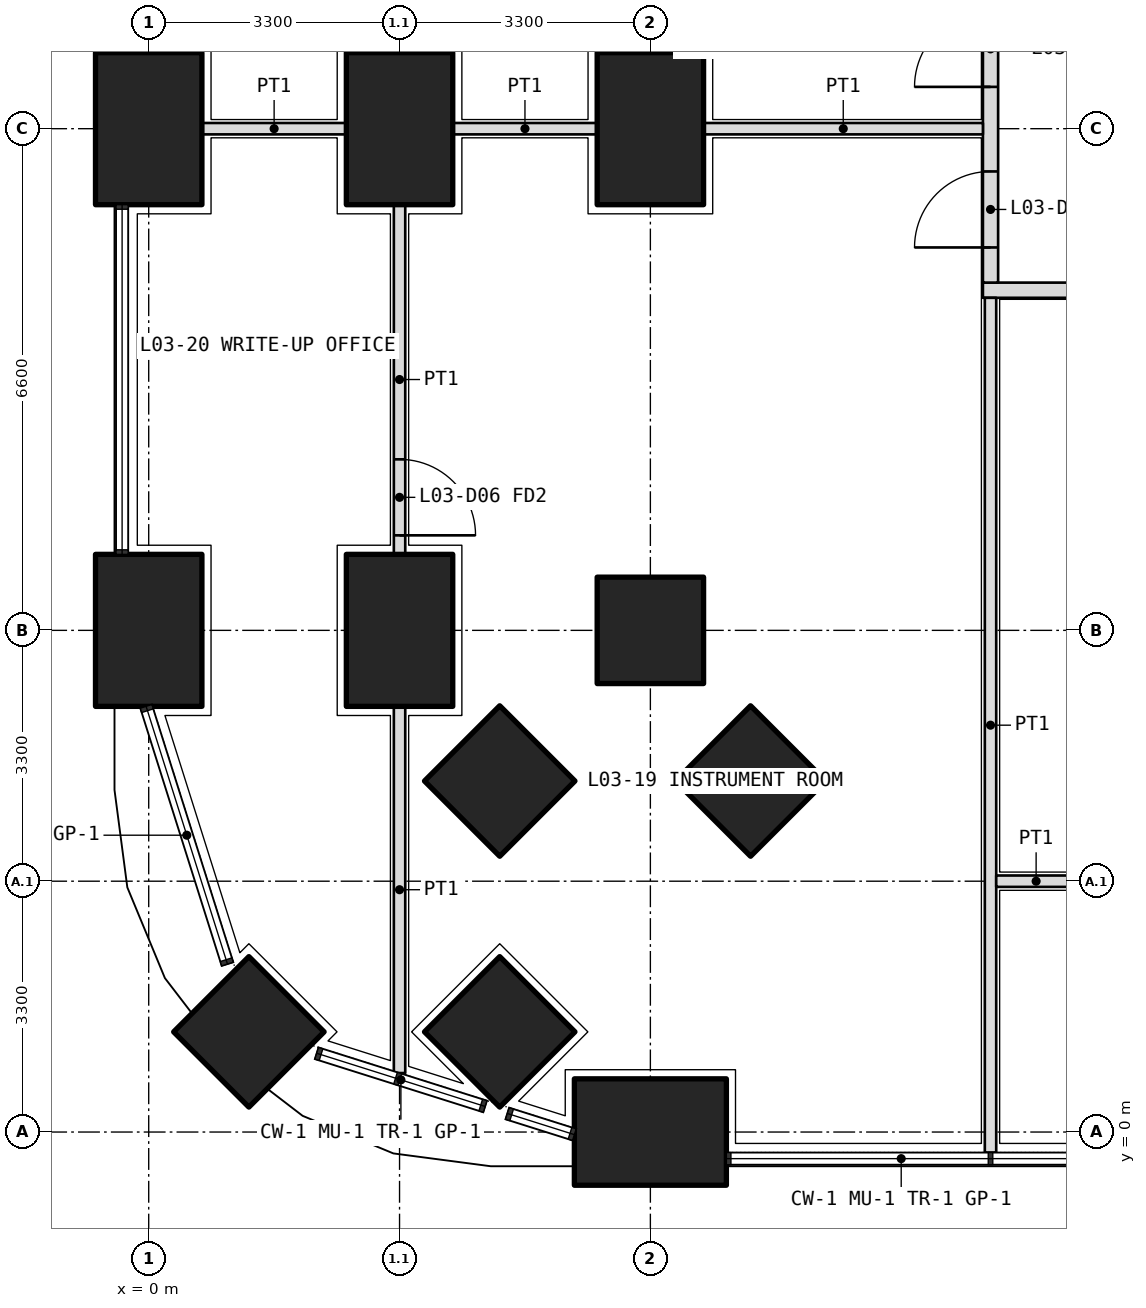
"""IFC4 building model, lengths in metres.
Left out: names, types, materials, properties, quantities, classifications, styles, units other than length and angle.
Written with IfcOpenShell. Run it as: python <this file> out.ifc"""

import sys

from ifc_helpers import new_model, si_unit, direction, frame, frame_2d, origin, origin_2d, place, context, subcontext, project, spatial, rectangle, extrude, element, fill, save


model = new_model("IFC4")
c1 = context("Model", 3, precision=1e-05, world=origin(), true_north=direction((0.0, 1.0)))
c2 = subcontext(c1, "Body", "Model", "MODEL_VIEW")
j1 = project(units=[si_unit("LENGTHUNIT", "METRE"), si_unit("PLANEANGLEUNIT", "RADIAN")], contexts=[c1])
p1 = place(None, origin())
s1 = spatial("IfcSite", under=j1, at=p1, CompositionType="ELEMENT")
p2 = place(p1, origin())
s2 = spatial("IfcBuilding", under=s1, at=p2, CompositionType="ELEMENT")
p3 = place(p2, frame((0.0, 0.0, 17.1)))
s3 = spatial("IfcBuildingStorey", under=s2, at=p3, CompositionType="ELEMENT", Elevation=17.1)
p4 = place(p3, frame((1.318, 1.318, 0.0), z_axis=(0.0, 0.0, 1.0), x_axis=(0.707106781187, 0.707106781187, 0.0)))
e1 = element("IfcColumn", 1, at=p4, inside=s3, PredefinedType="COLUMN", context=c2, shape_type="SweptSolid", body=[
    extrude(rectangle(XDim=1.4, YDim=1.4, at=origin_2d()), origin(), (0.0, 0.0, 1.0), 4.2),
])
for number, where, z_axis, x_axis in (
    (2, (6.6, 0.0, 0.0), (0.0, 0.0, 1.0), (1.0, 0.0, 0.0)),
    (3, (0.0, 6.6, 0.0), (0.0, 0.0, 1.0), (0.0, 1.0, 0.0)),
    (4, (0.0, 13.2, 0.0), (0.0, 0.0, 1.0), (0.0, 1.0, 0.0)),
):
    element("IfcColumn", number, at=place(p3, frame(where, z_axis=z_axis, x_axis=x_axis)), inside=s3, PredefinedType="COLUMN", context=c2, shape_type="SweptSolid", body=[
        extrude(rectangle(XDim=2.0, YDim=1.4, at=origin_2d()), origin(), (0.0, 0.0, 1.0), 4.2),
    ])
for number, where, z_axis, x_axis in (
    (5, (6.6, 6.6, 0.0), (0.0, 0.0, 1.0), (1.0, 0.0, 0.0)),
    (6, (4.618, 1.318, 0.0), (0.0, 0.0, 1.0), (0.707, 0.707, 0.0)),
):
    element("IfcColumn", number, at=place(p3, frame(where, z_axis=z_axis, x_axis=x_axis)), inside=s3, PredefinedType="COLUMN", context=c2, shape_type="SweptSolid", body=[
        extrude(rectangle(XDim=1.4, YDim=1.4, at=origin_2d()), origin(), (0.0, 0.0, 1.0), 4.2),
    ])
for number, where, z_axis, x_axis in (
    (7, (3.3, 6.6, 0.0), (0.0, 0.0, 1.0), (0.0, 1.0, 0.0)),
    (8, (3.3, 13.2, 0.0), (0.0, 0.0, 1.0), (0.0, 1.0, 0.0)),
):
    element("IfcColumn", number, at=place(p3, frame(where, z_axis=z_axis, x_axis=x_axis)), inside=s3, PredefinedType="COLUMN", context=c2, shape_type="SweptSolid", body=[
        extrude(rectangle(XDim=2.0, YDim=1.4, at=origin_2d()), origin(), (0.0, 0.0, 1.0), 4.2),
    ])
for number, where, z_axis, x_axis in (
    (9, (4.618, 4.618, 0.0), (0.0, 0.0, 1.0), (0.707, 0.707, 0.0)),
    (10, (7.918, 4.618, 0.0), (0.0, 0.0, 1.0), (0.707, 0.707, 0.0)),
):
    element("IfcColumn", number, at=place(p3, frame(where, z_axis=z_axis, x_axis=x_axis)), inside=s3, PredefinedType="COLUMN", context=c2, shape_type="SweptSolid", body=[
        extrude(rectangle(XDim=1.4, YDim=1.4, at=origin_2d()), origin(), (0.0, 0.0, 1.0), 4.2),
    ])
p5 = place(p3, frame((6.6, 13.2, 0.0), z_axis=(0.0, 0.0, 1.0), x_axis=(0.0, 1.0, 0.0)))
e11 = element("IfcColumn", 11, at=p5, inside=s3, PredefinedType="COLUMN", context=c2, shape_type="SweptSolid", body=[
    extrude(rectangle(XDim=2.0, YDim=1.4, at=origin_2d()), origin(), (0.0, 0.0, 1.0), 4.2),
])
p6 = place(p3, frame((10.975, 11.075, 0.0), z_axis=(0.0, 0.0, 1.0), x_axis=(1.0, 0.0, 0.0)))
e12 = element("IfcWall", 12, at=p6, inside=s3, PredefinedType="PARTITIONING", context=c2, shape_type="SweptSolid", body=[
    extrude(rectangle(XDim=18.725, YDim=0.2, at=frame_2d((9.362, 0.0))), origin(), (0.0, 0.0, 1.0), 2.85),
])
p7 = place(p6, frame((8.913, 0.0, 0.0)))
e13 = element("IfcOpeningElement", 13, at=p7, cuts=e12, PredefinedType="OPENING", context=c2, shape_type="SweptSolid", body=[
    extrude(rectangle(XDim=1.0, YDim=2.1, at=frame_2d((0.5, 1.05))), frame((0.0, 0.11, 0.0), z_axis=(0.0, -1.0, 0.0), x_axis=(1.0, 0.0, 0.0)), (0.0, 0.0, 1.0), 0.22),
])
p8 = place(p3, frame((11.075, 11.175, 0.0), z_axis=(0.0, 0.0, 1.0), x_axis=(0.0, 1.0, 0.0)))
e14 = element("IfcWall", 14, at=p8, inside=s3, PredefinedType="PARTITIONING", context=c2, shape_type="SweptSolid", body=[
    extrude(rectangle(XDim=23.85, YDim=0.2, at=frame_2d((11.925, 0.0))), origin(), (0.0, 0.0, 1.0), 2.85),
])
p9 = place(p8, frame((0.462, 0.0, 0.0)))
e15 = element("IfcOpeningElement", 15, at=p9, cuts=e14, PredefinedType="OPENING", context=c2, shape_type="SweptSolid", body=[
    extrude(rectangle(XDim=1.0, YDim=2.1, at=frame_2d((0.5, 1.05))), frame((0.0, 0.11, 0.0), z_axis=(0.0, -1.0, 0.0), x_axis=(1.0, 0.0, 0.0)), (0.0, 0.0, 1.0), 0.22),
])
p10 = place(p8, frame((2.575, 0.0, 0.0)))
e16 = element("IfcOpeningElement", 16, at=p10, cuts=e14, PredefinedType="OPENING", context=c2, shape_type="SweptSolid", body=[
    extrude(rectangle(XDim=1.0, YDim=2.1, at=frame_2d((0.5, 1.05))), frame((0.0, 0.11, 0.0), z_axis=(0.0, -1.0, 0.0), x_axis=(1.0, 0.0, 0.0)), (0.0, 0.0, 1.0), 0.22),
])
p11 = place(p8, frame((5.65, 0.0, 0.0)))
e17 = element("IfcOpeningElement", 17, at=p11, cuts=e14, PredefinedType="OPENING", context=c2, shape_type="SweptSolid", body=[
    extrude(rectangle(XDim=0.9, YDim=2.1, at=frame_2d((0.45, 1.05))), frame((0.0, 0.11, 0.0), z_axis=(0.0, -1.0, 0.0), x_axis=(1.0, 0.0, 0.0)), (0.0, 0.0, 1.0), 0.22),
])
p12 = place(p8, frame((9.5, 0.0, 0.0)))
e18 = element("IfcOpeningElement", 18, at=p12, cuts=e14, PredefinedType="OPENING", context=c2, shape_type="SweptSolid", body=[
    extrude(rectangle(XDim=0.9, YDim=2.1, at=frame_2d((0.45, 1.05))), frame((0.0, 0.11, 0.0), z_axis=(0.0, -1.0, 0.0), x_axis=(1.0, 0.0, 0.0)), (0.0, 0.0, 1.0), 0.22),
])
p13 = place(p8, frame((13.025, 0.0, 0.0)))
e19 = element("IfcOpeningElement", 19, at=p13, cuts=e14, PredefinedType="OPENING", context=c2, shape_type="SweptSolid", body=[
    extrude(rectangle(XDim=1.0, YDim=2.1, at=frame_2d((0.5, 1.05))), frame((0.0, 0.11, 0.0), z_axis=(0.0, -1.0, 0.0), x_axis=(1.0, 0.0, 0.0)), (0.0, 0.0, 1.0), 0.22),
])
p14 = place(p8, frame((16.375, 0.0, 0.0)))
e20 = element("IfcOpeningElement", 20, at=p14, cuts=e14, PredefinedType="OPENING", context=c2, shape_type="SweptSolid", body=[
    extrude(rectangle(XDim=1.0, YDim=2.1, at=frame_2d((0.5, 1.05))), frame((0.0, 0.11, 0.0), z_axis=(0.0, -1.0, 0.0), x_axis=(1.0, 0.0, 0.0)), (0.0, 0.0, 1.0), 0.22),
])
p15 = place(p8, frame((20.738, 0.0, 0.0)))
e21 = element("IfcOpeningElement", 21, at=p15, cuts=e14, PredefinedType="OPENING", context=c2, shape_type="SweptSolid", body=[
    extrude(rectangle(XDim=1.0, YDim=2.1, at=frame_2d((0.5, 1.05))), frame((0.0, 0.11, 0.0), z_axis=(0.0, -1.0, 0.0), x_axis=(1.0, 0.0, 0.0)), (0.0, 0.0, 1.0), 0.22),
])
p16 = place(p3, frame((11.075, -0.27, 0.0), z_axis=(0.0, 0.0, 1.0), x_axis=(0.0, 1.0, 0.0)))
e22 = element("IfcWall", 22, at=p16, inside=s3, PredefinedType="PARTITIONING", context=c2, shape_type="SweptSolid", body=[
    extrude(rectangle(XDim=11.245, YDim=0.15, at=frame_2d((5.623, 0.0))), origin(), (0.0, 0.0, 1.0), 2.7),
])
p17 = place(p3, frame((11.15, 3.3, 0.0), z_axis=(0.0, 0.0, 1.0), x_axis=(1.0, 0.0, 0.0)))
e23 = element("IfcWall", 23, at=p17, inside=s3, PredefinedType="PARTITIONING", context=c2, shape_type="SweptSolid", body=[
    extrude(rectangle(XDim=1.05, YDim=0.15, at=frame_2d((0.525, 0.0))), origin(), (0.0, 0.0, 1.0), 3.9),
])
p18 = place(p3, frame((3.3, 12.2, 0.0), z_axis=(0.0, 0.0, 1.0), x_axis=(0.0, -1.0, 0.0)))
e24 = element("IfcWall", 24, at=p18, inside=s3, PredefinedType="PARTITIONING", context=c2, shape_type="SweptSolid", body=[
    extrude(rectangle(XDim=4.6, YDim=0.15, at=frame_2d((2.3, 0.0))), origin(), (0.0, 0.0, 1.0), 3.9),
])
p19 = place(p18, frame((3.35, 0.0, 0.0)))
e25 = element("IfcOpeningElement", 25, at=p19, cuts=e24, PredefinedType="OPENING", context=c2, shape_type="SweptSolid", body=[
    extrude(rectangle(XDim=1.0, YDim=2.1, at=frame_2d((0.5, 1.05))), frame((0.0, 0.085, 0.0), z_axis=(0.0, -1.0, 0.0), x_axis=(1.0, 0.0, 0.0)), (0.0, 0.0, 1.0), 0.17),
])
p20 = place(p3, frame((3.3, 5.6, 0.0), z_axis=(0.0, 0.0, 1.0), x_axis=(0.0, -1.0, 0.0)))
e26 = element("IfcWall", 26, at=p20, inside=s3, PredefinedType="PARTITIONING", context=c2, shape_type="SweptSolid", body=[
    extrude(rectangle(XDim=4.824, YDim=0.15, at=frame_2d((2.412, 0.0))), origin(), (0.0, 0.0, 1.0), 2.7),
])
p21 = place(p3, frame((0.7, 13.2, 0.0), z_axis=(0.0, 0.0, 1.0), x_axis=(1.0, 0.0, 0.0)))
e27 = element("IfcWall", 27, at=p21, inside=s3, PredefinedType="PARTITIONING", context=c2, shape_type="SweptSolid", body=[
    extrude(rectangle(XDim=1.9, YDim=0.15, at=frame_2d((0.95, 0.0))), origin(), (0.0, 0.0, 1.0), 2.85),
])
p22 = place(p3, frame((4.0, 13.2, 0.0), z_axis=(0.0, 0.0, 1.0), x_axis=(1.0, 0.0, 0.0)))
e28 = element("IfcWall", 28, at=p22, inside=s3, PredefinedType="PARTITIONING", context=c2, shape_type="SweptSolid", body=[
    extrude(rectangle(XDim=1.9, YDim=0.15, at=frame_2d((0.95, 0.0))), origin(), (0.0, 0.0, 1.0), 2.85),
])
p23 = place(p3, frame((7.3, 13.2, 0.0), z_axis=(0.0, 0.0, 1.0), x_axis=(1.0, 0.0, 0.0)))
e29 = element("IfcWall", 29, at=p23, inside=s3, PredefinedType="PARTITIONING", context=c2, shape_type="SweptSolid", body=[
    extrude(rectangle(XDim=3.675, YDim=0.15, at=frame_2d((1.837, 0.0))), origin(), (0.0, 0.0, 1.0), 2.85),
])
p24 = place(p9, origin())
e30 = element("IfcDoor", 30, at=p24, inside=s3, OperationType="SINGLE_SWING_LEFT", PredefinedType="DOOR", context=c2, shape_type="SweptSolid", body=[
    extrude(rectangle(XDim=1.0, YDim=2.1, at=frame_2d((0.5, 1.05))), frame((0.0, 0.025, 0.0), z_axis=(0.0, -1.0, 0.0), x_axis=(1.0, 0.0, 0.0)), (0.0, 0.0, 1.0), 0.05),
])
fill(e15, e30)
p25 = place(p19, origin())
e31 = element("IfcDoor", 31, at=p25, inside=s3, OperationType="SINGLE_SWING_RIGHT", PredefinedType="DOOR", context=c2, shape_type="SweptSolid", body=[
    extrude(rectangle(XDim=1.0, YDim=2.1, at=frame_2d((0.5, 1.05))), frame((0.0, 0.025, 0.0), z_axis=(0.0, -1.0, 0.0), x_axis=(1.0, 0.0, 0.0)), (0.0, 0.0, 1.0), 0.05),
])
fill(e25, e31)
p26 = place(p10, origin())
e32 = element("IfcDoor", 32, at=p26, inside=s3, OperationType="SINGLE_SWING_LEFT", PredefinedType="DOOR", context=c2, shape_type="SweptSolid", body=[
    extrude(rectangle(XDim=1.0, YDim=2.1, at=frame_2d((0.5, 1.05))), frame((0.0, 0.025, 0.0), z_axis=(0.0, -1.0, 0.0), x_axis=(1.0, 0.0, 0.0)), (0.0, 0.0, 1.0), 0.05),
])
fill(e16, e32)
save(model, sys.argv[1])
